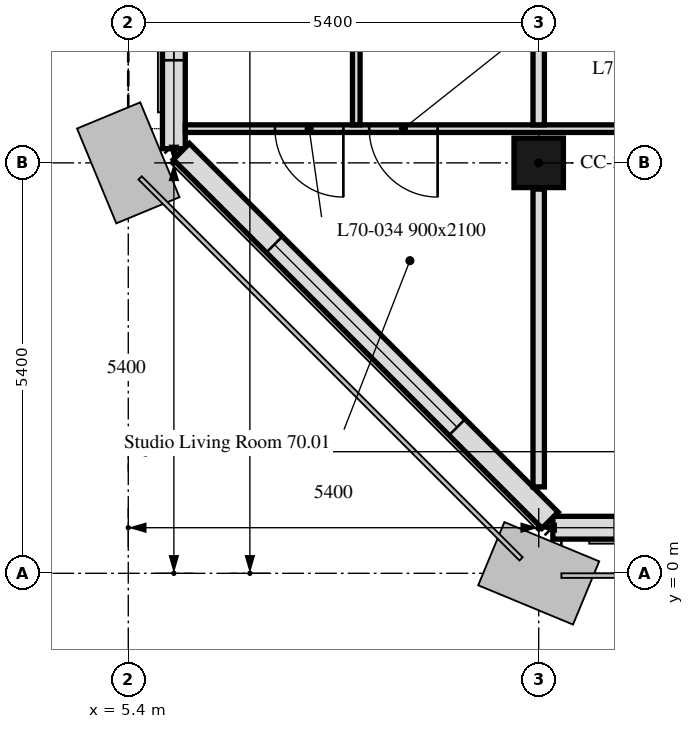
"""IFC4 building model, lengths in metres.
Left out: names, types, materials, properties, quantities, classifications, styles, units other than length and angle.
Written with IfcOpenShell. Run it as: python <this file> out.ifc"""

import sys

from ifc_helpers import new_model, si_unit, direction, frame, frame_2d, origin, origin_2d, place, context, subcontext, project, spatial, rectangle, extrude, element, fill, save


model = new_model("IFC4")
c1 = context("Model", 3, precision=1e-05, world=origin(), true_north=direction((0.0, 1.0)))
c2 = subcontext(c1, "Body", "Model", "MODEL_VIEW")
j1 = project(units=[si_unit("LENGTHUNIT", "METRE"), si_unit("PLANEANGLEUNIT", "RADIAN")], contexts=[c1])
p1 = place(None, origin())
s1 = spatial("IfcSite", under=j1, at=p1, CompositionType="ELEMENT")
p2 = place(p1, origin())
s2 = spatial("IfcBuilding", under=s1, at=p2, CompositionType="ELEMENT")
p3 = place(p2, frame((0.0, 0.0, 285.1)))
s3 = spatial("IfcBuildingStorey", under=s2, at=p3, CompositionType="ELEMENT", Elevation=285.1)
p4 = place(p3, frame((10.8, 5.4, 0.0), z_axis=(0.0, 0.0, 1.0), x_axis=(1.0, 0.0, 0.0)))
e1 = element("IfcColumn", 1, at=p4, inside=s3, PredefinedType="COLUMN", context=c2, shape_type="SweptSolid", body=[
    extrude(rectangle(XDim=0.65, YDim=0.65, at=origin_2d()), origin(), (0.0, 0.0, 1.0), 3.0),
])
p5 = place(p3, frame((10.986, 0.6, 0.0), z_axis=(0.0, 0.0, 1.0), x_axis=(1.0, 0.0, 0.0)))
e2 = element("IfcWall", 2, at=p5, inside=s3, PredefinedType="SOLIDWALL", context=c2, shape_type="SweptSolid", body=[
    extrude(rectangle(XDim=32.027, YDim=0.3, at=frame_2d((16.014, 0.0))), origin(), (0.0, 0.0, 1.0), 3.0),
])
p6 = place(p5, frame((0.814, 0.0, 0.9)))
e3 = element("IfcOpeningElement", 3, at=p6, cuts=e2, PredefinedType="OPENING", context=c2, shape_type="SweptSolid", body=[
    extrude(rectangle(XDim=3.4, YDim=1.7, at=frame_2d((1.7, 0.85))), frame((0.0, 0.16, 0.0), z_axis=(0.0, -1.0, 0.0), x_axis=(1.0, 0.0, 0.0)), (0.0, 0.0, 1.0), 0.32),
])
p7 = place(p5, frame((6.564, 0.0, 0.9)))
e4 = element("IfcOpeningElement", 4, at=p7, cuts=e2, PredefinedType="OPENING", context=c2, shape_type="SweptSolid", body=[
    extrude(rectangle(XDim=1.1, YDim=1.7, at=frame_2d((0.55, 0.85))), frame((0.0, 0.16, 0.0), z_axis=(0.0, -1.0, 0.0), x_axis=(1.0, 0.0, 0.0)), (0.0, 0.0, 1.0), 0.32),
])
p8 = place(p5, frame((11.614, 0.0, 0.9)))
e5 = element("IfcOpeningElement", 5, at=p8, cuts=e2, PredefinedType="OPENING", context=c2, shape_type="SweptSolid", body=[
    extrude(rectangle(XDim=3.4, YDim=1.7, at=frame_2d((1.7, 0.85))), frame((0.0, 0.16, 0.0), z_axis=(0.0, -1.0, 0.0), x_axis=(1.0, 0.0, 0.0)), (0.0, 0.0, 1.0), 0.32),
])
p9 = place(p5, frame((17.364, 0.0, 0.9)))
e6 = element("IfcOpeningElement", 6, at=p9, cuts=e2, PredefinedType="OPENING", context=c2, shape_type="SweptSolid", body=[
    extrude(rectangle(XDim=1.1, YDim=1.7, at=frame_2d((0.55, 0.85))), frame((0.0, 0.16, 0.0), z_axis=(0.0, -1.0, 0.0), x_axis=(1.0, 0.0, 0.0)), (0.0, 0.0, 1.0), 0.32),
])
p10 = place(p5, frame((22.414, 0.0, 0.9)))
e7 = element("IfcOpeningElement", 7, at=p10, cuts=e2, PredefinedType="OPENING", context=c2, shape_type="SweptSolid", body=[
    extrude(rectangle(XDim=3.4, YDim=1.7, at=frame_2d((1.7, 0.85))), frame((0.0, 0.16, 0.0), z_axis=(0.0, -1.0, 0.0), x_axis=(1.0, 0.0, 0.0)), (0.0, 0.0, 1.0), 0.32),
])
p11 = place(p5, frame((28.164, 0.0, 0.9)))
e8 = element("IfcOpeningElement", 8, at=p11, cuts=e2, PredefinedType="OPENING", context=c2, shape_type="SweptSolid", body=[
    extrude(rectangle(XDim=1.1, YDim=1.7, at=frame_2d((0.55, 0.85))), frame((0.0, 0.16, 0.0), z_axis=(0.0, -1.0, 0.0), x_axis=(1.0, 0.0, 0.0)), (0.0, 0.0, 1.0), 0.32),
])
p12 = place(p3, frame((6.0, 16.2, 0.0), z_axis=(0.0, 0.0, 1.0), x_axis=(0.0, -1.0, 0.0)))
e9 = element("IfcWall", 9, at=p12, inside=s3, PredefinedType="SOLIDWALL", context=c2, shape_type="SweptSolid", body=[
    extrude(rectangle(XDim=10.614, YDim=0.3, at=frame_2d((5.307, 0.0))), origin(), (0.0, 0.0, 1.0), 3.0),
])
p13 = place(p12, frame((1.0, 0.0, 0.9)))
e10 = element("IfcOpeningElement", 10, at=p13, cuts=e9, PredefinedType="OPENING", context=c2, shape_type="SweptSolid", body=[
    extrude(rectangle(XDim=1.1, YDim=1.7, at=frame_2d((0.55, 0.85))), frame((0.0, 0.16, 0.0), z_axis=(0.0, -1.0, 0.0), x_axis=(1.0, 0.0, 0.0)), (0.0, 0.0, 1.0), 0.32),
])
p14 = place(p12, frame((2.95, 0.0, 0.9)))
e11 = element("IfcOpeningElement", 11, at=p14, cuts=e9, PredefinedType="OPENING", context=c2, shape_type="SweptSolid", body=[
    extrude(rectangle(XDim=1.1, YDim=1.7, at=frame_2d((0.55, 0.85))), frame((0.0, 0.16, 0.0), z_axis=(0.0, -1.0, 0.0), x_axis=(1.0, 0.0, 0.0)), (0.0, 0.0, 1.0), 0.32),
])
p15 = place(p12, frame((6.75, 0.0, 0.9)))
e12 = element("IfcOpeningElement", 12, at=p15, cuts=e9, PredefinedType="OPENING", context=c2, shape_type="SweptSolid", body=[
    extrude(rectangle(XDim=1.1, YDim=1.7, at=frame_2d((0.55, 0.85))), frame((0.0, 0.16, 0.0), z_axis=(0.0, -1.0, 0.0), x_axis=(1.0, 0.0, 0.0)), (0.0, 0.0, 1.0), 0.32),
])
p16 = place(p12, frame((8.35, 0.0, 0.9)))
e13 = element("IfcOpeningElement", 13, at=p16, cuts=e9, PredefinedType="OPENING", context=c2, shape_type="SweptSolid", body=[
    extrude(rectangle(XDim=1.1, YDim=1.7, at=frame_2d((0.55, 0.85))), frame((0.0, 0.16, 0.0), z_axis=(0.0, -1.0, 0.0), x_axis=(1.0, 0.0, 0.0)), (0.0, 0.0, 1.0), 0.32),
])
p17 = place(p3, frame((6.099, 5.55, 0.0), z_axis=(0.0, 0.0, 1.0), x_axis=(0.707106781187, -0.707106781187, 0.0)))
e14 = element("IfcWall", 14, at=p17, inside=s3, PredefinedType="SOLIDWALL", context=c2, shape_type="SweptSolid", body=[
    extrude(rectangle(XDim=6.86, YDim=0.3, at=frame_2d((3.43, 0.0))), origin(), (0.0, 0.0, 1.0), 3.0),
])
p18 = place(p17, frame((1.73, 0.0, 0.9)))
e15 = element("IfcOpeningElement", 15, at=p18, cuts=e14, PredefinedType="OPENING", context=c2, shape_type="SweptSolid", body=[
    extrude(rectangle(XDim=3.4, YDim=1.7, at=frame_2d((1.7, 0.85))), frame((0.0, 0.16, 0.0), z_axis=(0.0, -1.0, 0.0), x_axis=(1.0, 0.0, 0.0)), (0.0, 0.0, 1.0), 0.32),
])
p19 = place(p3, frame((10.8, 1.137, 0.0), z_axis=(0.0, 0.0, 1.0), x_axis=(0.0, 1.0, 0.0)))
e16 = element("IfcWall", 16, at=p19, inside=s3, PredefinedType="PARTITIONING", context=c2, shape_type="SweptSolid", body=[
    extrude(rectangle(XDim=3.918, YDim=0.15, at=frame_2d((1.959, 0.0))), origin(), (0.0, 0.0, 1.0), 3.0),
])
p20 = place(p3, frame((37.652, 5.85, 0.0), z_axis=(0.0, 0.0, 1.0), x_axis=(-1.0, 0.0, 0.0)))
e17 = element("IfcWall", 17, at=p20, inside=s3, PredefinedType="PARTITIONING", context=c2, shape_type="SweptSolid", body=[
    extrude(rectangle(XDim=31.501, YDim=0.1, at=frame_2d((15.75, 0.0))), origin(), (0.0, 0.0, 1.0), 2.4),
])
p21 = place(p20, frame((12.923, 0.0, 0.0)))
e18 = element("IfcOpeningElement", 18, at=p21, cuts=e17, PredefinedType="OPENING", context=c2, shape_type="SweptSolid", body=[
    extrude(rectangle(XDim=0.9, YDim=2.1, at=frame_2d((0.45, 1.05))), frame((0.0, 0.05, 0.0), z_axis=(0.0, -1.0, 0.0), x_axis=(1.0, 0.0, 0.0)), (0.0, 0.0, 1.0), 0.1),
])
p22 = place(p20, frame((29.422, 0.0, 0.0)))
e19 = element("IfcOpeningElement", 19, at=p22, cuts=e17, PredefinedType="OPENING", context=c2, shape_type="SweptSolid", body=[
    extrude(rectangle(XDim=0.9, YDim=2.1, at=frame_2d((0.45, 1.05))), frame((0.0, 0.05, 0.0), z_axis=(0.0, -1.0, 0.0), x_axis=(1.0, 0.0, 0.0)), (0.0, 0.0, 1.0), 0.1),
])
p23 = place(p20, frame((28.182, 0.0, 0.0)))
e20 = element("IfcOpeningElement", 20, at=p23, cuts=e17, PredefinedType="OPENING", context=c2, shape_type="SweptSolid", body=[
    extrude(rectangle(XDim=0.9, YDim=2.1, at=frame_2d((0.45, 1.05))), frame((0.0, 0.05, 0.0), z_axis=(0.0, -1.0, 0.0), x_axis=(1.0, 0.0, 0.0)), (0.0, 0.0, 1.0), 0.1),
])
p24 = place(p20, frame((23.942, 0.0, 0.0)))
e21 = element("IfcOpeningElement", 21, at=p24, cuts=e17, PredefinedType="OPENING", context=c2, shape_type="SweptSolid", body=[
    extrude(rectangle(XDim=0.9, YDim=2.1, at=frame_2d((0.45, 1.05))), frame((0.0, 0.05, 0.0), z_axis=(0.0, -1.0, 0.0), x_axis=(1.0, 0.0, 0.0)), (0.0, 0.0, 1.0), 0.1),
])
p25 = place(p20, frame((22.572, 0.0, 0.0)))
e22 = element("IfcOpeningElement", 22, at=p25, cuts=e17, PredefinedType="OPENING", context=c2, shape_type="SweptSolid", body=[
    extrude(rectangle(XDim=0.9, YDim=2.1, at=frame_2d((0.45, 1.05))), frame((0.0, 0.05, 0.0), z_axis=(0.0, -1.0, 0.0), x_axis=(1.0, 0.0, 0.0)), (0.0, 0.0, 1.0), 0.1),
])
p26 = place(p20, frame((19.466, 0.0, 0.0)))
e23 = element("IfcOpeningElement", 23, at=p26, cuts=e17, PredefinedType="OPENING", context=c2, shape_type="SweptSolid", body=[
    extrude(rectangle(XDim=0.9, YDim=2.1, at=frame_2d((0.45, 1.05))), frame((0.0, 0.05, 0.0), z_axis=(0.0, -1.0, 0.0), x_axis=(1.0, 0.0, 0.0)), (0.0, 0.0, 1.0), 0.1),
])
p27 = place(p20, frame((9.19, 0.0, 0.0)))
e24 = element("IfcOpeningElement", 24, at=p27, cuts=e17, PredefinedType="OPENING", context=c2, shape_type="SweptSolid", body=[
    extrude(rectangle(XDim=0.9, YDim=2.1, at=frame_2d((0.45, 1.05))), frame((0.0, 0.05, 0.0), z_axis=(0.0, -1.0, 0.0), x_axis=(1.0, 0.0, 0.0)), (0.0, 0.0, 1.0), 0.1),
])
p28 = place(p20, frame((7.512, 0.0, 0.0)))
e25 = element("IfcOpeningElement", 25, at=p28, cuts=e17, PredefinedType="OPENING", context=c2, shape_type="SweptSolid", body=[
    extrude(rectangle(XDim=0.9, YDim=2.1, at=frame_2d((0.45, 1.05))), frame((0.0, 0.05, 0.0), z_axis=(0.0, -1.0, 0.0), x_axis=(1.0, 0.0, 0.0)), (0.0, 0.0, 1.0), 0.1),
])
p29 = place(p20, frame((2.952, 0.0, 0.0)))
e26 = element("IfcOpeningElement", 26, at=p29, cuts=e17, PredefinedType="OPENING", context=c2, shape_type="SweptSolid", body=[
    extrude(rectangle(XDim=0.9, YDim=2.1, at=frame_2d((0.45, 1.05))), frame((0.0, 0.05, 0.0), z_axis=(0.0, -1.0, 0.0), x_axis=(1.0, 0.0, 0.0)), (0.0, 0.0, 1.0), 0.1),
])
p30 = place(p20, frame((18.096, 0.0, 0.0)))
e27 = element("IfcOpeningElement", 27, at=p30, cuts=e17, PredefinedType="OPENING", context=c2, shape_type="SweptSolid", body=[
    extrude(rectangle(XDim=0.9, YDim=2.1, at=frame_2d((0.45, 1.05))), frame((0.0, 0.05, 0.0), z_axis=(0.0, -1.0, 0.0), x_axis=(1.0, 0.0, 0.0)), (0.0, 0.0, 1.0), 0.1),
])
p31 = place(p3, frame((8.4, 5.9, 0.0), z_axis=(0.0, 0.0, 1.0), x_axis=(0.0, 1.0, 0.0)))
e28 = element("IfcWall", 28, at=p31, inside=s3, PredefinedType="PARTITIONING", context=c2, shape_type="SweptSolid", body=[
    extrude(rectangle(XDim=7.975, YDim=0.1, at=frame_2d((3.988, 0.0))), origin(), (0.0, 0.0, 1.0), 3.0),
])
p32 = place(p31, frame((6.35, 0.0, 0.0)))
e29 = element("IfcOpeningElement", 29, at=p32, cuts=e28, PredefinedType="OPENING", context=c2, shape_type="SweptSolid", body=[
    extrude(rectangle(XDim=0.9, YDim=2.1, at=frame_2d((0.45, 1.05))), frame((0.0, 0.05, 0.0), z_axis=(0.0, -1.0, 0.0), x_axis=(1.0, 0.0, 0.0)), (0.0, 0.0, 1.0), 0.1),
])
p33 = place(p31, frame((2.3, 0.0, 0.0)))
e30 = element("IfcOpeningElement", 30, at=p33, cuts=e28, PredefinedType="OPENING", context=c2, shape_type="SweptSolid", body=[
    extrude(rectangle(XDim=0.9, YDim=2.1, at=frame_2d((0.45, 1.05))), frame((0.0, 0.05, 0.0), z_axis=(0.0, -1.0, 0.0), x_axis=(1.0, 0.0, 0.0)), (0.0, 0.0, 1.0), 0.1),
])
p34 = place(p3, frame((10.8, 5.9, 0.0), z_axis=(0.0, 0.0, 1.0), x_axis=(0.0, 1.0, 0.0)))
e31 = element("IfcWall", 31, at=p34, inside=s3, PredefinedType="PARTITIONING", context=c2, shape_type="SweptSolid", body=[
    extrude(rectangle(XDim=4.555, YDim=0.15, at=frame_2d((2.278, 0.0))), origin(), (0.0, 0.0, 1.0), 3.0),
])
p35 = place(p16, origin())
e32 = element("IfcWindow", 32, at=p35, inside=s3, PartitioningType="SINGLE_PANEL", PredefinedType="WINDOW", context=c2, shape_type="SweptSolid", body=[
    extrude(rectangle(XDim=1.1, YDim=1.7, at=frame_2d((0.55, 0.85))), frame((0.0, 0.03, 0.0), z_axis=(0.0, -1.0, 0.0), x_axis=(1.0, 0.0, 0.0)), (0.0, 0.0, 1.0), 0.06),
])
fill(e13, e32)
p36 = place(p18, origin())
e33 = element("IfcWindow", 33, at=p36, inside=s3, PartitioningType="SINGLE_PANEL", PredefinedType="WINDOW", context=c2, shape_type="SweptSolid", body=[
    extrude(rectangle(XDim=3.4, YDim=1.7, at=frame_2d((1.7, 0.85))), frame((0.0, 0.03, 0.0), z_axis=(0.0, -1.0, 0.0), x_axis=(1.0, 0.0, 0.0)), (0.0, 0.0, 1.0), 0.06),
])
fill(e15, e33)
p37 = place(p22, origin())
e34 = element("IfcDoor", 34, at=p37, inside=s3, OperationType="SINGLE_SWING_LEFT", PredefinedType="DOOR", context=c2, shape_type="SweptSolid", body=[
    extrude(rectangle(XDim=0.9, YDim=2.1, at=frame_2d((0.45, 1.05))), frame((0.0, 0.025, 0.0), z_axis=(0.0, -1.0, 0.0), x_axis=(1.0, 0.0, 0.0)), (0.0, 0.0, 1.0), 0.05),
])
fill(e19, e34)
p38 = place(p23, origin())
e35 = element("IfcDoor", 35, at=p38, inside=s3, OperationType="SINGLE_SWING_RIGHT", PredefinedType="DOOR", context=c2, shape_type="SweptSolid", body=[
    extrude(rectangle(XDim=0.9, YDim=2.1, at=frame_2d((0.45, 1.05))), frame((0.0, 0.025, 0.0), z_axis=(0.0, -1.0, 0.0), x_axis=(1.0, 0.0, 0.0)), (0.0, 0.0, 1.0), 0.05),
])
fill(e20, e35)
save(model, sys.argv[1])
